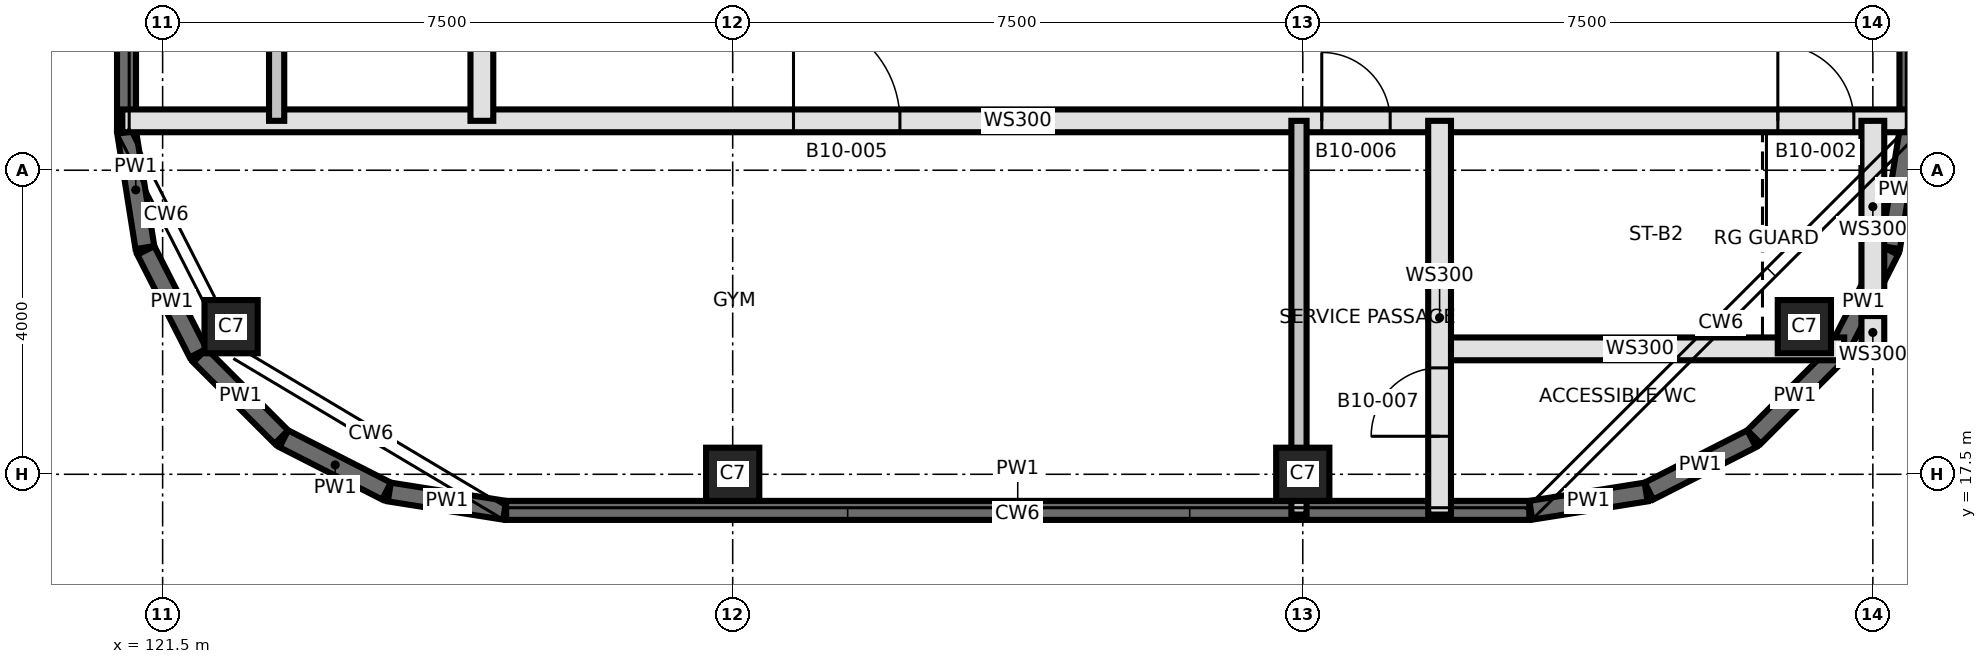
"""IFC4 building model, lengths in metres.
Left out: names, types, materials, properties, quantities, classifications, styles, units other than length and angle.
Written with IfcOpenShell. Run it as: python <this file> out.ifc"""

import sys

from ifc_helpers import new_model, si_unit, direction, frame, frame_2d, origin, origin_2d, place, context, subcontext, project, spatial, rectangle, extrude, element, fill, save


model = new_model("IFC4")
c1 = context("Model", 3, precision=1e-05, world=origin(), true_north=direction((0.0, 1.0)))
c2 = subcontext(c1, "Body", "Model", "MODEL_VIEW")
j1 = project(units=[si_unit("LENGTHUNIT", "METRE"), si_unit("PLANEANGLEUNIT", "RADIAN")], contexts=[c1])
p1 = place(None, origin())
s1 = spatial("IfcSite", under=j1, at=p1, CompositionType="ELEMENT")
p2 = place(p1, origin())
s2 = spatial("IfcBuilding", under=s1, at=p2, CompositionType="ELEMENT")
p3 = place(p2, frame((0.0, 0.0, 101.9)))
s3 = spatial("IfcBuildingStorey", under=s2, at=p3, CompositionType="ELEMENT", Elevation=101.9)
for number, where, z_axis, x_axis in (
    (1, (129.0, 17.5, 0.0), (0.0, 0.0, 1.0), (1.0, 0.0, 0.0)),
    (2, (136.5, 17.5, 0.0), (0.0, 0.0, 1.0), (1.0, 0.0, 0.0)),
    (3, (122.401, 19.442, 0.0), (0.0, 0.0, 1.0), (1.0, 0.0, 0.0)),
    (4, (143.099, 19.442, 0.0), (0.0, 0.0, 1.0), (1.0, 0.0, 0.0)),
):
    element("IfcColumn", number, at=place(p3, frame(where, z_axis=z_axis, x_axis=x_axis)), inside=s3, PredefinedType="COLUMN", context=c2, shape_type="SweptSolid", body=[
        extrude(rectangle(XDim=0.7, YDim=0.7, at=origin_2d()), origin(), (0.0, 0.0, 1.0), 3.7),
    ])
p4 = place(p3, frame((121.025, 28.35, 3.7), z_axis=(0.0, 0.0, 1.0), x_axis=(0.0, -1.0, 0.0)))
e5 = element("IfcWall", 5, at=p4, inside=s3, PredefinedType="PARAPET", context=c2, shape_type="SweptSolid", body=[
    extrude(rectangle(XDim=6.33, YDim=0.25, at=frame_2d((3.165, 0.0))), origin(), (0.0, 0.0, 1.0), 1.1),
])
p5 = place(p3, frame((121.027, 22.0, 3.7), z_axis=(0.0, 0.0, 1.0), x_axis=(0.156378762167, -0.987697161453, 0.0)))
e6 = element("IfcWall", 6, at=p5, inside=s3, PredefinedType="PARAPET", context=c2, shape_type="SweptSolid", body=[
    extrude(rectangle(XDim=1.536, YDim=0.25, at=frame_2d((0.768, 0.0))), origin(), (0.0, 0.0, 1.0), 1.1),
])
p6 = place(p3, frame((121.279, 20.446, 3.7), z_axis=(0.0, 0.0, 1.0), x_axis=(0.453961953638, -0.891021068577, 0.0)))
e7 = element("IfcWall", 7, at=p6, inside=s3, PredefinedType="PARAPET", context=c2, shape_type="SweptSolid", body=[
    extrude(rectangle(XDim=1.517, YDim=0.25, at=frame_2d((0.758, 0.0))), origin(), (0.0, 0.0, 1.0), 1.1),
])
p7 = place(p3, frame((121.99, 19.063, 3.7), z_axis=(0.0, 0.0, 1.0), x_axis=(0.707106781187, -0.707106781187, 0.0)))
e8 = element("IfcWall", 8, at=p7, inside=s3, PredefinedType="PARAPET", context=c2, shape_type="SweptSolid", body=[
    extrude(rectangle(XDim=1.516, YDim=0.25, at=frame_2d((0.758, 0.0))), origin(), (0.0, 0.0, 1.0), 1.1),
])
p8 = place(p3, frame((123.094, 17.968, 3.7), z_axis=(0.0, 0.0, 1.0), x_axis=(0.891021068577, -0.453961953638, 0.0)))
e9 = element("IfcWall", 9, at=p8, inside=s3, PredefinedType="PARAPET", context=c2, shape_type="SweptSolid", body=[
    extrude(rectangle(XDim=1.517, YDim=0.25, at=frame_2d((0.758, 0.0))), origin(), (0.0, 0.0, 1.0), 1.1),
])
p9 = place(p3, frame((124.483, 17.267, 3.7), z_axis=(0.0, 0.0, 1.0), x_axis=(0.987697161453, -0.156378762167, 0.0)))
e10 = element("IfcWall", 10, at=p9, inside=s3, PredefinedType="PARAPET", context=c2, shape_type="SweptSolid", body=[
    extrude(rectangle(XDim=1.536, YDim=0.25, at=frame_2d((0.768, 0.0))), origin(), (0.0, 0.0, 1.0), 1.1),
])
p10 = place(p3, frame((126.02, 17.025, 3.7), z_axis=(0.0, 0.0, 1.0), x_axis=(1.0, 0.0, 0.0)))
e11 = element("IfcWall", 11, at=p10, inside=s3, PredefinedType="PARAPET", context=c2, shape_type="SweptSolid", body=[
    extrude(rectangle(XDim=13.46, YDim=0.25, at=frame_2d((6.73, 0.0))), origin(), (0.0, 0.0, 1.0), 1.1),
])
p11 = place(p3, frame((139.5, 17.027, 3.7), z_axis=(0.0, 0.0, 1.0), x_axis=(0.987697161453, 0.156378762167, 0.0)))
e12 = element("IfcWall", 12, at=p11, inside=s3, PredefinedType="PARAPET", context=c2, shape_type="SweptSolid", body=[
    extrude(rectangle(XDim=1.536, YDim=0.25, at=frame_2d((0.768, 0.0))), origin(), (0.0, 0.0, 1.0), 1.1),
])
p12 = place(p3, frame((141.054, 17.279, 3.7), z_axis=(0.0, 0.0, 1.0), x_axis=(0.891021068577, 0.453961953638, 0.0)))
e13 = element("IfcWall", 13, at=p12, inside=s3, PredefinedType="PARAPET", context=c2, shape_type="SweptSolid", body=[
    extrude(rectangle(XDim=1.517, YDim=0.25, at=frame_2d((0.758, 0.0))), origin(), (0.0, 0.0, 1.0), 1.1),
])
p13 = place(p3, frame((142.437, 17.99, 3.7), z_axis=(0.0, 0.0, 1.0), x_axis=(0.707106781187, 0.707106781187, 0.0)))
e14 = element("IfcWall", 14, at=p13, inside=s3, PredefinedType="PARAPET", context=c2, shape_type="SweptSolid", body=[
    extrude(rectangle(XDim=1.516, YDim=0.25, at=frame_2d((0.758, 0.0))), origin(), (0.0, 0.0, 1.0), 1.1),
])
p14 = place(p3, frame((143.532, 19.094, 3.7), z_axis=(0.0, 0.0, 1.0), x_axis=(0.453961953638, 0.891021068577, 0.0)))
e15 = element("IfcWall", 15, at=p14, inside=s3, PredefinedType="PARAPET", context=c2, shape_type="SweptSolid", body=[
    extrude(rectangle(XDim=1.517, YDim=0.25, at=frame_2d((0.758, 0.0))), origin(), (0.0, 0.0, 1.0), 1.1),
])
p15 = place(p3, frame((144.233, 20.483, 3.7), z_axis=(0.0, 0.0, 1.0), x_axis=(0.156378762167, 0.987697161453, 0.0)))
e16 = element("IfcWall", 16, at=p15, inside=s3, PredefinedType="PARAPET", context=c2, shape_type="SweptSolid", body=[
    extrude(rectangle(XDim=1.536, YDim=0.25, at=frame_2d((0.768, 0.0))), origin(), (0.0, 0.0, 1.0), 1.1),
])
p16 = place(p3, frame((144.475, 22.02, 3.7), z_axis=(0.0, 0.0, 1.0), x_axis=(0.0, 1.0, 0.0)))
e17 = element("IfcWall", 17, at=p16, inside=s3, PredefinedType="PARAPET", context=c2, shape_type="SweptSolid", body=[
    extrude(rectangle(XDim=17.96, YDim=0.25, at=frame_2d((8.98, 0.0))), origin(), (0.0, 0.0, 1.0), 1.1),
])
p17 = place(p3, frame((138.25, 19.15, 0.0), z_axis=(0.0, 0.0, 1.0), x_axis=(1.0, 0.0, 0.0)))
e18 = element("IfcWall", 18, at=p17, inside=s3, PredefinedType="SOLIDWALL", context=c2, shape_type="SweptSolid", body=[
    extrude(rectangle(XDim=5.373, YDim=0.3, at=frame_2d((2.687, 0.0))), origin(), (0.0, 0.0, 1.0), 3.3),
])
p18 = place(p3, frame((120.97, 22.15, 0.0), z_axis=(0.0, 0.0, 1.0), x_axis=(1.0, 0.0, 0.0)))
e19 = element("IfcWall", 19, at=p18, inside=s3, PredefinedType="SOLIDWALL", context=c2, shape_type="SweptSolid", body=[
    extrude(rectangle(XDim=23.56, YDim=0.3, at=frame_2d((11.78, 0.0))), origin(), (0.0, 0.0, 1.0), 3.3),
])
p19 = place(p18, frame((21.78, 0.0, 0.0)))
e20 = element("IfcOpeningElement", 20, at=p19, cuts=e19, PredefinedType="OPENING", context=c2, shape_type="SweptSolid", body=[
    extrude(rectangle(XDim=1.0, YDim=2.1, at=frame_2d((0.5, 1.05))), frame((0.0, 0.16, 0.0), z_axis=(0.0, -1.0, 0.0), x_axis=(1.0, 0.0, 0.0)), (0.0, 0.0, 1.0), 0.32),
])
p20 = place(p18, frame((8.83, 0.0, 0.0)))
e21 = element("IfcOpeningElement", 21, at=p20, cuts=e19, PredefinedType="OPENING", context=c2, shape_type="SweptSolid", body=[
    extrude(rectangle(XDim=1.4, YDim=2.1, at=frame_2d((0.7, 1.05))), frame((0.0, 0.16, 0.0), z_axis=(0.0, -1.0, 0.0), x_axis=(1.0, 0.0, 0.0)), (0.0, 0.0, 1.0), 0.32),
])
p21 = place(p18, frame((15.78, 0.0, 0.0)))
e22 = element("IfcOpeningElement", 22, at=p21, cuts=e19, PredefinedType="OPENING", context=c2, shape_type="SweptSolid", body=[
    extrude(rectangle(XDim=0.9, YDim=2.1, at=frame_2d((0.45, 1.05))), frame((0.0, 0.16, 0.0), z_axis=(0.0, -1.0, 0.0), x_axis=(1.0, 0.0, 0.0)), (0.0, 0.0, 1.0), 0.32),
])
p22 = place(p3, frame((123.0, 22.15, 0.0), z_axis=(0.0, 0.0, 1.0), x_axis=(0.0, 1.0, 0.0)))
e23 = element("IfcWall", 23, at=p22, inside=s3, PredefinedType="PARTITIONING", context=c2, shape_type="SweptSolid", body=[
    extrude(rectangle(XDim=17.7, YDim=0.2, at=frame_2d((8.85, 0.0))), origin(), (0.0, 0.0, 1.0), 3.3),
])
p23 = place(p22, frame((7.75, 0.0, 0.0)))
e24 = element("IfcOpeningElement", 24, at=p23, cuts=e23, PredefinedType="OPENING", context=c2, shape_type="SweptSolid", body=[
    extrude(rectangle(XDim=1.2, YDim=2.1, at=frame_2d((0.6, 1.05))), frame((0.0, 0.11, 0.0), z_axis=(0.0, -1.0, 0.0), x_axis=(1.0, 0.0, 0.0)), (0.0, 0.0, 1.0), 0.22),
])
p24 = place(p22, frame((2.6, 0.0, 0.0)))
e25 = element("IfcOpeningElement", 25, at=p24, cuts=e23, PredefinedType="OPENING", context=c2, shape_type="SweptSolid", body=[
    extrude(rectangle(XDim=1.0, YDim=2.1, at=frame_2d((0.5, 1.05))), frame((0.0, 0.11, 0.0), z_axis=(0.0, -1.0, 0.0), x_axis=(1.0, 0.0, 0.0)), (0.0, 0.0, 1.0), 0.22),
])
p25 = place(p22, frame((14.1, 0.0, 0.0)))
e26 = element("IfcOpeningElement", 26, at=p25, cuts=e23, PredefinedType="OPENING", context=c2, shape_type="SweptSolid", body=[
    extrude(rectangle(XDim=1.0, YDim=2.1, at=frame_2d((0.5, 1.05))), frame((0.0, 0.11, 0.0), z_axis=(0.0, -1.0, 0.0), x_axis=(1.0, 0.0, 0.0)), (0.0, 0.0, 1.0), 0.22),
])
p26 = place(p3, frame((125.7, 22.15, 0.0), z_axis=(0.0, 0.0, 1.0), x_axis=(0.0, 1.0, 0.0)))
e27 = element("IfcWall", 27, at=p26, inside=s3, PredefinedType="SOLIDWALL", context=c2, shape_type="SweptSolid", body=[
    extrude(rectangle(XDim=17.7, YDim=0.3, at=frame_2d((8.85, 0.0))), origin(), (0.0, 0.0, 1.0), 3.3),
])
p27 = place(p26, frame((3.1, 0.0, 0.0)))
e28 = element("IfcOpeningElement", 28, at=p27, cuts=e27, PredefinedType="OPENING", context=c2, shape_type="SweptSolid", body=[
    extrude(rectangle(XDim=1.5, YDim=2.1, at=frame_2d((0.75, 1.05))), frame((0.0, 0.16, 0.0), z_axis=(0.0, -1.0, 0.0), x_axis=(1.0, 0.0, 0.0)), (0.0, 0.0, 1.0), 0.32),
])
p28 = place(p3, frame((136.45, 16.97, 0.0), z_axis=(0.0, 0.0, 1.0), x_axis=(0.0, 1.0, 0.0)))
e29 = element("IfcWall", 29, at=p28, inside=s3, PredefinedType="PARTITIONING", context=c2, shape_type="SweptSolid", body=[
    extrude(rectangle(XDim=5.18, YDim=0.2, at=frame_2d((2.59, 0.0))), origin(), (0.0, 0.0, 1.0), 3.3),
])
p29 = place(p3, frame((138.3, 16.97, 0.0), z_axis=(0.0, 0.0, 1.0), x_axis=(0.0, 1.0, 0.0)))
e30 = element("IfcWall", 30, at=p29, inside=s3, PredefinedType="SOLIDWALL", context=c2, shape_type="SweptSolid", body=[
    extrude(rectangle(XDim=5.18, YDim=0.3, at=frame_2d((2.59, 0.0))), origin(), (0.0, 0.0, 1.0), 3.3),
])
p30 = place(p29, frame((1.03, 0.0, 0.0)))
e31 = element("IfcOpeningElement", 31, at=p30, cuts=e30, PredefinedType="OPENING", context=c2, shape_type="SweptSolid", body=[
    extrude(rectangle(XDim=0.9, YDim=2.1, at=frame_2d((0.45, 1.05))), frame((0.0, 0.16, 0.0), z_axis=(0.0, -1.0, 0.0), x_axis=(1.0, 0.0, 0.0)), (0.0, 0.0, 1.0), 0.32),
])
p31 = place(p3, frame((144.0, 19.15, 0.0), z_axis=(0.0, 0.0, 1.0), x_axis=(0.0, 1.0, 0.0)))
e32 = element("IfcWall", 32, at=p31, inside=s3, PredefinedType="SOLIDWALL", context=c2, shape_type="SweptSolid", body=[
    extrude(rectangle(XDim=0.432, YDim=0.3, at=frame_2d((0.216, 0.0))), origin(), (0.0, 0.0, 1.0), 3.3),
])
p32 = place(p3, frame((144.0, 19.891, 0.0), z_axis=(0.0, 0.0, 1.0), x_axis=(0.0, 1.0, 0.0)))
e33 = element("IfcWall", 33, at=p32, inside=s3, PredefinedType="SOLIDWALL", context=c2, shape_type="SweptSolid", body=[
    extrude(rectangle(XDim=2.259, YDim=0.3, at=frame_2d((1.129, 0.0))), origin(), (0.0, 0.0, 1.0), 3.3),
])
p33 = place(p19, origin())
e34 = element("IfcDoor", 34, at=p33, inside=s3, OperationType="SINGLE_SWING_RIGHT", PredefinedType="DOOR", context=c2, shape_type="SweptSolid", body=[
    extrude(rectangle(XDim=1.0, YDim=2.1, at=frame_2d((0.5, 1.05))), frame((0.0, 0.025, 0.0), z_axis=(0.0, -1.0, 0.0), x_axis=(1.0, 0.0, 0.0)), (0.0, 0.0, 1.0), 0.05),
])
fill(e20, e34)
p34 = place(p20, origin())
e35 = element("IfcDoor", 35, at=p34, inside=s3, OperationType="SINGLE_SWING_LEFT", PredefinedType="DOOR", context=c2, shape_type="SweptSolid", body=[
    extrude(rectangle(XDim=1.4, YDim=2.1, at=frame_2d((0.7, 1.05))), frame((0.0, 0.025, 0.0), z_axis=(0.0, -1.0, 0.0), x_axis=(1.0, 0.0, 0.0)), (0.0, 0.0, 1.0), 0.05),
])
fill(e21, e35)
p35 = place(p21, origin())
e36 = element("IfcDoor", 36, at=p35, inside=s3, OperationType="SINGLE_SWING_RIGHT", PredefinedType="DOOR", context=c2, shape_type="SweptSolid", body=[
    extrude(rectangle(XDim=0.9, YDim=2.1, at=frame_2d((0.45, 1.05))), frame((0.0, 0.025, 0.0), z_axis=(0.0, -1.0, 0.0), x_axis=(1.0, 0.0, 0.0)), (0.0, 0.0, 1.0), 0.05),
])
fill(e22, e36)
p36 = place(p30, origin())
e37 = element("IfcDoor", 37, at=p36, inside=s3, OperationType="SINGLE_SWING_RIGHT", PredefinedType="DOOR", context=c2, shape_type="SweptSolid", body=[
    extrude(rectangle(XDim=0.9, YDim=2.1, at=frame_2d((0.45, 1.05))), frame((0.0, 0.025, 0.0), z_axis=(0.0, -1.0, 0.0), x_axis=(1.0, 0.0, 0.0)), (0.0, 0.0, 1.0), 0.05),
])
fill(e31, e37)
save(model, sys.argv[1])
